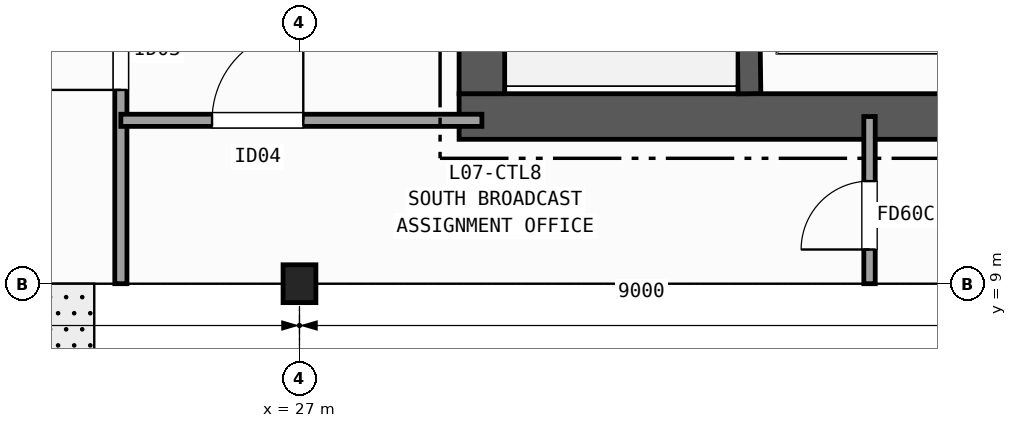
"""IFC4 building model, lengths in metres.
Left out: names, types, materials, properties, quantities, classifications, styles, units other than length and angle.
Written with IfcOpenShell. Run it as: python <this file> out.ifc"""

import sys

from ifc_helpers import new_model, si_unit, direction, frame, frame_2d, origin, origin_2d, place, context, subcontext, project, spatial, rectangle, i_section, extrude, element, fill, save


model = new_model("IFC4")
c1 = context("Model", 3, precision=1e-05, world=origin(), true_north=direction((0.0, 1.0)))
c2 = subcontext(c1, "Body", "Model", "MODEL_VIEW")
j1 = project(units=[si_unit("LENGTHUNIT", "METRE"), si_unit("PLANEANGLEUNIT", "RADIAN")], contexts=[c1])
p1 = place(None, origin())
s1 = spatial("IfcSite", under=j1, at=p1, CompositionType="ELEMENT")
p2 = place(p1, origin())
s2 = spatial("IfcBuilding", under=s1, at=p2, CompositionType="ELEMENT")
p3 = place(p2, frame((0.0, 0.0, 36.0)))
s3 = spatial("IfcBuildingStorey", under=s2, at=p3, CompositionType="ELEMENT", Elevation=36.0)
p4 = place(p3, frame((27.0, 9.0, 0.0), z_axis=(0.0, 0.0, 1.0), x_axis=(1.0, 0.0, 0.0)))
e1 = element("IfcColumn", 1, at=p4, inside=s3, PredefinedType="COLUMN", context=c2, shape_type="SweptSolid", body=[
    extrude(i_section(OverallWidth=0.432, OverallDepth=0.498, WebThickness=0.056, FlangeThickness=0.089, FilletRadius=0.015, at=origin_2d()), origin(), (0.0, 0.0, 1.0), 3.7),
])
p5 = place(p3, frame((29.1, 11.2, 0.0), z_axis=(0.0, 0.0, 1.0), x_axis=(1.0, 0.0, 0.0)))
e2 = element("IfcWall", 2, at=p5, inside=s3, PredefinedType="SHEAR", context=c2, shape_type="SweptSolid", body=[
    extrude(rectangle(XDim=14.0, YDim=0.6, at=frame_2d((7.0, 0.0))), origin(), (0.0, 0.0, 1.0), 3.42),
])
p6 = place(p3, frame((29.4, 24.3, 0.0), z_axis=(0.0, 0.0, 1.0), x_axis=(0.0, -1.0, 0.0)))
e3 = element("IfcWall", 3, at=p6, inside=s3, PredefinedType="SHEAR", context=c2, shape_type="SweptSolid", body=[
    extrude(rectangle(XDim=12.8, YDim=0.6, at=frame_2d((6.4, 0.0))), origin(), (0.0, 0.0, 1.0), 3.42),
])
p7 = place(p6, frame((1.4, 0.0, 0.0)))
e4 = element("IfcOpeningElement", 4, at=p7, cuts=e3, PredefinedType="OPENING", context=c2, shape_type="SweptSolid", body=[
    extrude(rectangle(XDim=1.35, YDim=2.15, at=frame_2d((0.675, 1.075))), frame((0.0, 0.31, 0.0), z_axis=(0.0, -1.0, 0.0), x_axis=(1.0, 0.0, 0.0)), (0.0, 0.0, 1.0), 0.62),
])
p8 = place(p3, frame((32.92, 11.5, 0.0), z_axis=(0.0, 0.0, 1.0), x_axis=(-0.013244407292, 0.999912288991, 0.0)))
e5 = element("IfcWall", 5, at=p8, inside=s3, PredefinedType="SHEAR", context=c2, shape_type="SweptSolid", body=[
    extrude(rectangle(XDim=9.051, YDim=0.3, at=frame_2d((4.525, 0.0))), origin(), (0.0, 0.0, 1.0), 3.42),
])
p9 = place(p3, frame((24.65, 9.0, 0.0), z_axis=(0.0, 0.0, 1.0), x_axis=(0.0, 1.0, 0.0)))
e6 = element("IfcWall", 6, at=p9, inside=s3, PredefinedType="PARTITIONING", context=c2, shape_type="SweptSolid", body=[
    extrude(rectangle(XDim=19.2, YDim=0.16, at=frame_2d((9.6, 0.0))), origin(), (0.0, 0.0, 1.0), 2.627),
])
p10 = place(p9, frame((2.55, 0.0, 0.0)))
e7 = element("IfcOpeningElement", 7, at=p10, cuts=e6, PredefinedType="OPENING", context=c2, shape_type="SweptSolid", body=[
    extrude(rectangle(XDim=1.05, YDim=2.15, at=frame_2d((0.525, 1.075))), frame((0.0, 0.09, 0.0), z_axis=(0.0, -1.0, 0.0), x_axis=(1.0, 0.0, 0.0)), (0.0, 0.0, 1.0), 0.18),
])
p11 = place(p9, frame((8.55, 0.0, 0.0)))
e8 = element("IfcOpeningElement", 8, at=p11, cuts=e6, PredefinedType="OPENING", context=c2, shape_type="SweptSolid", body=[
    extrude(rectangle(XDim=1.2, YDim=2.15, at=frame_2d((0.6, 1.075))), frame((0.0, 0.09, 0.0), z_axis=(0.0, -1.0, 0.0), x_axis=(1.0, 0.0, 0.0)), (0.0, 0.0, 1.0), 0.18),
])
p12 = place(p9, frame((13.44, 0.0, 0.0)))
e9 = element("IfcOpeningElement", 9, at=p12, cuts=e6, PredefinedType="OPENING", context=c2, shape_type="SweptSolid", body=[
    extrude(rectangle(XDim=0.86, YDim=2.05, at=frame_2d((0.43, 1.025))), frame((0.0, 0.09, 0.0), z_axis=(0.0, -1.0, 0.0), x_axis=(1.0, 0.0, 0.0)), (0.0, 0.0, 1.0), 0.18),
])
p13 = place(p3, frame((24.65, 11.15, 0.0), z_axis=(0.0, 0.0, 1.0), x_axis=(1.0, 0.0, 0.0)))
e10 = element("IfcWall", 10, at=p13, inside=s3, PredefinedType="PARTITIONING", context=c2, shape_type="SweptSolid", body=[
    extrude(rectangle(XDim=4.75, YDim=0.16, at=frame_2d((2.375, 0.0))), origin(), (0.0, 0.0, 1.0), 2.792),
])
p14 = place(p13, frame((1.2, 0.0, 0.0)))
e11 = element("IfcOpeningElement", 11, at=p14, cuts=e10, PredefinedType="OPENING", context=c2, shape_type="SweptSolid", body=[
    extrude(rectangle(XDim=1.2, YDim=2.15, at=frame_2d((0.6, 1.075))), frame((0.0, 0.09, 0.0), z_axis=(0.0, -1.0, 0.0), x_axis=(1.0, 0.0, 0.0)), (0.0, 0.0, 1.0), 0.18),
])
p15 = place(p3, frame((34.5, 9.0, 0.0), z_axis=(0.0, 0.0, 1.0), x_axis=(0.0, 1.0, 0.0)))
e12 = element("IfcWall", 12, at=p15, inside=s3, PredefinedType="PARTITIONING", context=c2, shape_type="SweptSolid", body=[
    extrude(rectangle(XDim=2.2, YDim=0.15, at=frame_2d((1.1, 0.0))), origin(), (0.0, 0.0, 1.0), 2.627),
])
p16 = place(p15, frame((0.45, 0.0, 0.0)))
e13 = element("IfcOpeningElement", 13, at=p16, cuts=e12, PredefinedType="OPENING", context=c2, shape_type="SweptSolid", body=[
    extrude(rectangle(XDim=0.9, YDim=2.1, at=frame_2d((0.45, 1.05))), frame((0.0, 0.085, 0.0), z_axis=(0.0, -1.0, 0.0), x_axis=(1.0, 0.0, 0.0)), (0.0, 0.0, 1.0), 0.17),
])
p17 = place(p10, origin())
e14 = element("IfcDoor", 14, at=p17, inside=s3, OperationType="SINGLE_SWING_LEFT", PredefinedType="DOOR", context=c2, shape_type="SweptSolid", body=[
    extrude(rectangle(XDim=1.05, YDim=2.15, at=frame_2d((0.525, 1.075))), frame((0.0, 0.025, 0.0), z_axis=(0.0, -1.0, 0.0), x_axis=(1.0, 0.0, 0.0)), (0.0, 0.0, 1.0), 0.05),
])
fill(e7, e14)
p18 = place(p14, origin())
e15 = element("IfcDoor", 15, at=p18, inside=s3, OperationType="SINGLE_SWING_RIGHT", PredefinedType="DOOR", context=c2, shape_type="SweptSolid", body=[
    extrude(rectangle(XDim=1.2, YDim=2.15, at=frame_2d((0.6, 1.075))), frame((0.0, 0.025, 0.0), z_axis=(0.0, -1.0, 0.0), x_axis=(1.0, 0.0, 0.0)), (0.0, 0.0, 1.0), 0.05),
])
fill(e11, e15)
p19 = place(p16, origin())
e16 = element("IfcDoor", 16, at=p19, inside=s3, OperationType="SINGLE_SWING_LEFT", PredefinedType="DOOR", context=c2, shape_type="SweptSolid", body=[
    extrude(rectangle(XDim=0.9, YDim=2.1, at=frame_2d((0.45, 1.05))), frame((0.0, 0.025, 0.0), z_axis=(0.0, -1.0, 0.0), x_axis=(1.0, 0.0, 0.0)), (0.0, 0.0, 1.0), 0.05),
])
fill(e13, e16)
save(model, sys.argv[1])
